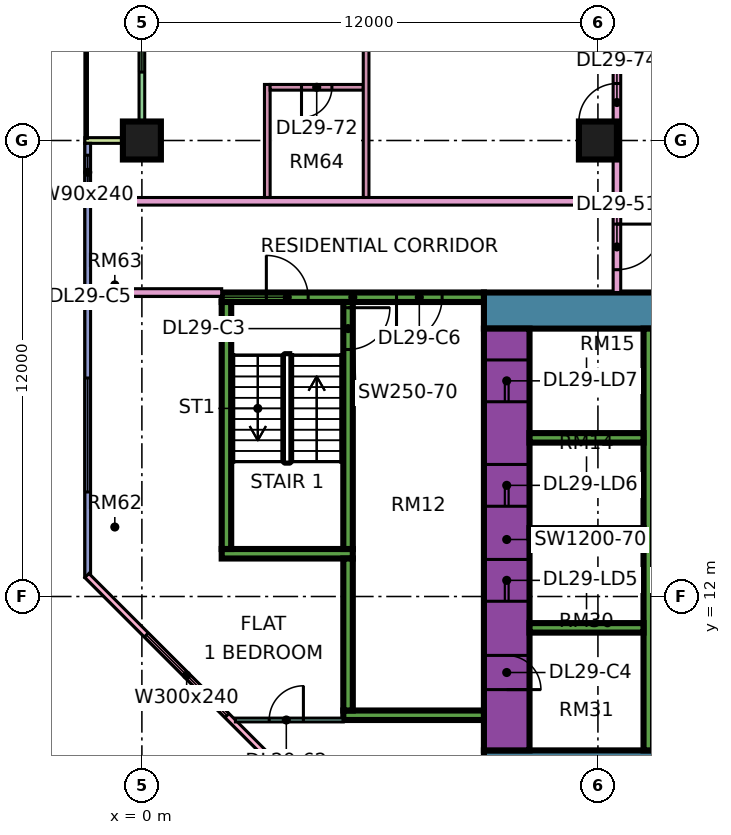
"""IFC4 building model, lengths in metres.
Left out: names, types, materials, properties, quantities, classifications, styles, units other than length and angle.
Written with IfcOpenShell. Run it as: python <this file> out.ifc"""

import sys

from ifc_helpers import new_model, si_unit, direction, frame, frame_2d, origin, origin_2d, place, context, subcontext, project, spatial, rectangle, extrude, element, fill, save


model = new_model("IFC4")
c1 = context("Model", 3, precision=1e-05, world=origin(), true_north=direction((0.0, 1.0)))
c2 = subcontext(c1, "Body", "Model", "MODEL_VIEW")
j1 = project(units=[si_unit("LENGTHUNIT", "METRE"), si_unit("PLANEANGLEUNIT", "RADIAN")], contexts=[c1])
p1 = place(None, origin())
s1 = spatial("IfcSite", under=j1, at=p1, CompositionType="ELEMENT")
p2 = place(p1, origin())
s2 = spatial("IfcBuilding", under=s1, at=p2, CompositionType="ELEMENT")
p3 = place(p2, frame((0.0, 0.0, 125.65)))
s3 = spatial("IfcBuildingStorey", under=s2, at=p3, CompositionType="ELEMENT", Elevation=125.65)
for number, where, z_axis, x_axis in (
    (1, (0.0, 24.0, 0.0), (0.0, 0.0, 1.0), (1.0, 0.0, 0.0)),
    (2, (12.0, 24.0, 0.0), (0.0, 0.0, 1.0), (1.0, 0.0, 0.0)),
):
    element("IfcColumn", number, at=place(p3, frame(where, z_axis=z_axis, x_axis=x_axis)), inside=s3, PredefinedType="COLUMN", context=c2, shape_type="SweptSolid", body=[
        extrude(rectangle(XDim=1.0, YDim=1.0, at=origin_2d()), origin(), (0.0, 0.0, 1.0), 3.75),
    ])
p4 = place(p3, frame((9.0, 7.475, 0.0), z_axis=(0.0, 0.0, 1.0), x_axis=(1.0, 0.0, 0.0)))
e3 = element("IfcWall", 3, at=p4, inside=s3, PredefinedType="SHEAR", context=c2, shape_type="SweptSolid", body=[
    extrude(rectangle(XDim=25.0, YDim=0.95, at=frame_2d((12.5, 0.0))), origin(), (0.0, 0.0, 1.0), 3.75),
])
p5 = place(p3, frame((9.0, 19.525, 0.0), z_axis=(0.0, 0.0, 1.0), x_axis=(1.0, 0.0, 0.0)))
e4 = element("IfcWall", 4, at=p5, inside=s3, PredefinedType="SHEAR", context=c2, shape_type="SweptSolid", body=[
    extrude(rectangle(XDim=25.0, YDim=0.95, at=frame_2d((12.5, 0.0))), origin(), (0.0, 0.0, 1.0), 3.75),
])
p6 = place(p5, frame((19.1, 0.0, 0.0)))
e5 = element("IfcOpeningElement", 5, at=p6, cuts=e4, PredefinedType="OPENING", context=c2, shape_type="SweptSolid", body=[
    extrude(rectangle(XDim=1.8, YDim=2.4, at=frame_2d((0.9, 1.2))), frame((0.0, 0.485, 0.0), z_axis=(0.0, -1.0, 0.0), x_axis=(1.0, 0.0, 0.0)), (0.0, 0.0, 1.0), 0.97),
])
p7 = place(p3, frame((9.6, 7.95, 0.0), z_axis=(0.0, 0.0, 1.0), x_axis=(0.0, 1.0, 0.0)))
e6 = element("IfcWall", 6, at=p7, inside=s3, PredefinedType="SHEAR", context=c2, shape_type="SweptSolid", body=[
    extrude(rectangle(XDim=11.1, YDim=1.2, at=frame_2d((5.55, 0.0))), origin(), (0.0, 0.0, 1.0), 3.75),
])
p8 = place(p7, frame((3.925, 0.0, 0.0)))
e7 = element("IfcOpeningElement", 7, at=p8, cuts=e6, PredefinedType="OPENING", context=c2, shape_type="SweptSolid", body=[
    extrude(rectangle(XDim=1.1, YDim=2.2, at=frame_2d((0.55, 1.1))), frame((0.0, 0.61, 0.0), z_axis=(0.0, -1.0, 0.0), x_axis=(1.0, 0.0, 0.0)), (0.0, 0.0, 1.0), 1.22),
])
p9 = place(p7, frame((6.425, 0.0, 0.0)))
e8 = element("IfcOpeningElement", 8, at=p9, cuts=e6, PredefinedType="OPENING", context=c2, shape_type="SweptSolid", body=[
    extrude(rectangle(XDim=1.1, YDim=2.2, at=frame_2d((0.55, 1.1))), frame((0.0, 0.61, 0.0), z_axis=(0.0, -1.0, 0.0), x_axis=(1.0, 0.0, 0.0)), (0.0, 0.0, 1.0), 1.22),
])
p10 = place(p7, frame((9.175, 0.0, 0.0)))
e9 = element("IfcOpeningElement", 9, at=p10, cuts=e6, PredefinedType="OPENING", context=c2, shape_type="SweptSolid", body=[
    extrude(rectangle(XDim=1.1, YDim=2.2, at=frame_2d((0.55, 1.1))), frame((0.0, 0.61, 0.0), z_axis=(0.0, -1.0, 0.0), x_axis=(1.0, 0.0, 0.0)), (0.0, 0.0, 1.0), 1.22),
])
p11 = place(p7, frame((1.6, 0.0, 0.0)))
e10 = element("IfcOpeningElement", 10, at=p11, cuts=e6, PredefinedType="OPENING", context=c2, shape_type="SweptSolid", body=[
    extrude(rectangle(XDim=0.9, YDim=2.1, at=frame_2d((0.45, 1.05))), frame((0.0, 0.61, 0.0), z_axis=(0.0, -1.0, 0.0), x_axis=(1.0, 0.0, 0.0)), (0.0, 0.0, 1.0), 1.22),
])
p12 = place(p3, frame((13.325, 7.95, 0.0), z_axis=(0.0, 0.0, 1.0), x_axis=(0.0, 1.0, 0.0)))
e11 = element("IfcWall", 11, at=p12, inside=s3, PredefinedType="SHEAR", context=c2, shape_type="SweptSolid", body=[
    extrude(rectangle(XDim=11.1, YDim=0.25, at=frame_2d((5.55, 0.0))), origin(), (0.0, 0.0, 1.0), 3.75),
])
for number, where, z_axis, x_axis in (
    (12, (10.2, 11.175, 0.0), (0.0, 0.0, 1.0), (1.0, 0.0, 0.0)),
    (13, (10.2, 13.675, 0.0), (0.0, 0.0, 1.0), (1.0, 0.0, 0.0)),
    (14, (10.2, 16.175, 0.0), (0.0, 0.0, 1.0), (1.0, 0.0, 0.0)),
):
    element("IfcWall", number, at=place(p3, frame(where, z_axis=z_axis, x_axis=x_axis)), inside=s3, PredefinedType="SHEAR", context=c2, shape_type="SweptSolid", body=[
        extrude(rectangle(XDim=3.0, YDim=0.25, at=frame_2d((1.5, 0.0))), origin(), (0.0, 0.0, 1.0), 3.75),
    ])
p13 = place(p3, frame((2.1, 19.875, 0.0), z_axis=(0.0, 0.0, 1.0), x_axis=(1.0, 0.0, 0.0)))
e15 = element("IfcWall", 15, at=p13, inside=s3, PredefinedType="SHEAR", context=c2, shape_type="SweptSolid", body=[
    extrude(rectangle(XDim=6.9, YDim=0.25, at=frame_2d((3.45, 0.0))), origin(), (0.0, 0.0, 1.0), 3.75),
])
p14 = place(p13, frame((1.175, 0.0, 0.0)))
e16 = element("IfcOpeningElement", 16, at=p14, cuts=e15, PredefinedType="OPENING", context=c2, shape_type="SweptSolid", body=[
    extrude(rectangle(XDim=1.1, YDim=2.2, at=frame_2d((0.55, 1.1))), frame((0.0, 0.135, 0.0), z_axis=(0.0, -1.0, 0.0), x_axis=(1.0, 0.0, 0.0)), (0.0, 0.0, 1.0), 0.27),
])
p15 = place(p13, frame((4.6, 0.0, 0.0)))
e17 = element("IfcOpeningElement", 17, at=p15, cuts=e15, PredefinedType="OPENING", context=c2, shape_type="SweptSolid", body=[
    extrude(rectangle(XDim=1.2, YDim=2.2, at=frame_2d((0.6, 1.1))), frame((0.0, 0.135, 0.0), z_axis=(0.0, -1.0, 0.0), x_axis=(1.0, 0.0, 0.0)), (0.0, 0.0, 1.0), 0.27),
])
p16 = place(p3, frame((2.1, 13.125, 0.0), z_axis=(0.0, 0.0, 1.0), x_axis=(1.0, 0.0, 0.0)))
e18 = element("IfcWall", 18, at=p16, inside=s3, PredefinedType="SHEAR", context=c2, shape_type="SweptSolid", body=[
    extrude(rectangle(XDim=3.45, YDim=0.25, at=frame_2d((1.725, 0.0))), origin(), (0.0, 0.0, 1.0), 3.75),
])
p17 = place(p3, frame((2.225, 13.25, 0.0), z_axis=(0.0, 0.0, 1.0), x_axis=(0.0, 1.0, 0.0)))
e19 = element("IfcWall", 19, at=p17, inside=s3, PredefinedType="SHEAR", context=c2, shape_type="SweptSolid", body=[
    extrude(rectangle(XDim=6.5, YDim=0.25, at=frame_2d((3.25, 0.0))), origin(), (0.0, 0.0, 1.0), 3.75),
])
p18 = place(p3, frame((5.425, 13.25, 0.0), z_axis=(0.0, 0.0, 1.0), x_axis=(0.0, 1.0, 0.0)))
e20 = element("IfcWall", 20, at=p18, inside=s3, PredefinedType="SHEAR", context=c2, shape_type="SweptSolid", body=[
    extrude(rectangle(XDim=6.5, YDim=0.25, at=frame_2d((3.25, 0.0))), origin(), (0.0, 0.0, 1.0), 3.75),
])
p19 = place(p18, frame((5.25, 0.0, 0.0)))
e21 = element("IfcOpeningElement", 21, at=p19, cuts=e20, PredefinedType="OPENING", context=c2, shape_type="SweptSolid", body=[
    extrude(rectangle(XDim=1.1, YDim=2.2, at=frame_2d((0.55, 1.1))), frame((0.0, 0.135, 0.0), z_axis=(0.0, -1.0, 0.0), x_axis=(1.0, 0.0, 0.0)), (0.0, 0.0, 1.0), 0.27),
])
p20 = place(p3, frame((5.3, 8.875, 0.0), z_axis=(0.0, 0.0, 1.0), x_axis=(1.0, 0.0, 0.0)))
e22 = element("IfcWall", 22, at=p20, inside=s3, PredefinedType="SHEAR", context=c2, shape_type="SweptSolid", body=[
    extrude(rectangle(XDim=3.7, YDim=0.25, at=frame_2d((1.85, 0.0))), origin(), (0.0, 0.0, 1.0), 3.75),
])
p21 = place(p3, frame((5.425, 9.0, 0.0), z_axis=(0.0, 0.0, 1.0), x_axis=(0.0, 1.0, 0.0)))
e23 = element("IfcWall", 23, at=p21, inside=s3, PredefinedType="SHEAR", context=c2, shape_type="SweptSolid", body=[
    extrude(rectangle(XDim=4.0, YDim=0.25, at=frame_2d((2.0, 0.0))), origin(), (0.0, 0.0, 1.0), 3.75),
])
p22 = place(p3, frame((0.0, 35.925, 0.0), z_axis=(0.0, 0.0, 1.0), x_axis=(0.0, -1.0, 0.0)))
e24 = element("IfcWall", 24, at=p22, inside=s3, PredefinedType="SOLIDWALL", context=c2, shape_type="SweptSolid", body=[
    extrude(rectangle(XDim=11.85, YDim=0.15, at=frame_2d((5.925, 0.0))), origin(), (0.0, 0.0, 1.0), 3.35),
])
p23 = place(p22, frame((2.325, 0.0, 0.0)))
e25 = element("IfcOpeningElement", 25, at=p23, cuts=e24, PredefinedType="OPENING", context=c2, shape_type="SweptSolid", body=[
    extrude(rectangle(XDim=1.8, YDim=2.4, at=frame_2d((0.9, 1.2))), frame((0.0, 0.085, 0.0), z_axis=(0.0, -1.0, 0.0), x_axis=(1.0, 0.0, 0.0)), (0.0, 0.0, 1.0), 0.17),
])
p24 = place(p22, frame((7.125, 0.0, 0.45)))
e26 = element("IfcOpeningElement", 26, at=p24, cuts=e24, PredefinedType="OPENING", context=c2, shape_type="SweptSolid", body=[
    extrude(rectangle(XDim=3.0, YDim=2.4, at=frame_2d((1.5, 1.2))), frame((0.0, 0.085, 0.0), z_axis=(0.0, -1.0, 0.0), x_axis=(1.0, 0.0, 0.0)), (0.0, 0.0, 1.0), 0.17),
])
p25 = place(p3, frame((-1.5, 24.0, 0.0), z_axis=(0.0, 0.0, 1.0), x_axis=(1.0, 0.0, 0.0)))
e27 = element("IfcWall", 27, at=p25, inside=s3, PredefinedType="SOLIDWALL", context=c2, shape_type="SweptSolid", body=[
    extrude(rectangle(XDim=1.5, YDim=0.15, at=frame_2d((0.75, 0.0))), origin(), (0.0, 0.0, 1.0), 3.35),
])
p26 = place(p3, frame((-1.425, 23.925, 0.0), z_axis=(0.0, 0.0, 1.0), x_axis=(0.0, -1.0, 0.0)))
e28 = element("IfcWall", 28, at=p26, inside=s3, PredefinedType="SOLIDWALL", context=c2, shape_type="SweptSolid", body=[
    extrude(rectangle(XDim=11.425, YDim=0.15, at=frame_2d((5.712, 0.0))), origin(), (0.0, 0.0, 1.0), 3.35),
])
p27 = place(p26, frame((0.312, 0.0, 0.45)))
e29 = element("IfcOpeningElement", 29, at=p27, cuts=e28, PredefinedType="OPENING", context=c2, shape_type="SweptSolid", body=[
    extrude(rectangle(XDim=0.9, YDim=2.4, at=frame_2d((0.45, 1.2))), frame((0.0, 0.085, 0.0), z_axis=(0.0, -1.0, 0.0), x_axis=(1.0, 0.0, 0.0)), (0.0, 0.0, 1.0), 0.17),
])
p28 = place(p26, frame((6.175, 0.0, 0.45)))
e30 = element("IfcOpeningElement", 30, at=p28, cuts=e28, PredefinedType="OPENING", context=c2, shape_type="SweptSolid", body=[
    extrude(rectangle(XDim=3.0, YDim=2.4, at=frame_2d((1.5, 1.2))), frame((0.0, 0.085, 0.0), z_axis=(0.0, -1.0, 0.0), x_axis=(1.0, 0.0, 0.0)), (0.0, 0.0, 1.0), 0.17),
])
p29 = place(p3, frame((-1.447, 12.553, 0.0), z_axis=(0.0, 0.0, 1.0), x_axis=(0.707106781187, -0.707106781187, 0.0)))
e31 = element("IfcWall", 31, at=p29, inside=s3, PredefinedType="SOLIDWALL", context=c2, shape_type="SweptSolid", body=[
    extrude(rectangle(XDim=19.799, YDim=0.15, at=frame_2d((9.899, 0.0))), origin(), (0.0, 0.0, 1.0), 3.35),
])
p30 = place(p29, frame((2.212, 0.0, 0.45)))
e32 = element("IfcOpeningElement", 32, at=p30, cuts=e31, PredefinedType="OPENING", context=c2, shape_type="SweptSolid", body=[
    extrude(rectangle(XDim=3.0, YDim=2.4, at=frame_2d((1.5, 1.2))), frame((0.0, 0.085, 0.0), z_axis=(0.0, -1.0, 0.0), x_axis=(1.0, 0.0, 0.0)), (0.0, 0.0, 1.0), 0.17),
])
p31 = place(p29, frame((10.216, 0.0, 0.45)))
e33 = element("IfcOpeningElement", 33, at=p31, cuts=e31, PredefinedType="OPENING", context=c2, shape_type="SweptSolid", body=[
    extrude(rectangle(XDim=3.0, YDim=2.4, at=frame_2d((1.5, 1.2))), frame((0.0, 0.085, 0.0), z_axis=(0.0, -1.0, 0.0), x_axis=(1.0, 0.0, 0.0)), (0.0, 0.0, 1.0), 0.17),
])
p32 = place(p3, frame((-1.35, 20.0, 0.0), z_axis=(0.0, 0.0, 1.0), x_axis=(1.0, 0.0, 0.0)))
e34 = element("IfcWall", 34, at=p32, inside=s3, PredefinedType="PARTITIONING", context=c2, shape_type="SweptSolid", body=[
    extrude(rectangle(XDim=3.45, YDim=0.2, at=frame_2d((1.725, 0.0))), origin(), (0.0, 0.0, 1.0), 3.35),
])
p33 = place(p3, frame((-1.35, 22.4, 0.0), z_axis=(0.0, 0.0, 1.0), x_axis=(1.0, 0.0, 0.0)))
e35 = element("IfcWall", 35, at=p33, inside=s3, PredefinedType="PARTITIONING", context=c2, shape_type="SweptSolid", body=[
    extrude(rectangle(XDim=13.75, YDim=0.2, at=frame_2d((6.875, 0.0))), origin(), (0.0, 0.0, 1.0), 3.35),
])
p34 = place(p3, frame((2.461, 8.75, 0.0), z_axis=(0.0, 0.0, 1.0), x_axis=(1.0, 0.0, 0.0)))
e36 = element("IfcWall", 36, at=p34, inside=s3, PredefinedType="PARTITIONING", context=c2, shape_type="SweptSolid", body=[
    extrude(rectangle(XDim=2.839, YDim=0.1, at=frame_2d((1.419, 0.0))), origin(), (0.0, 0.0, 1.0), 3.35),
])
p35 = place(p34, frame((0.889, 0.0, 0.0)))
e37 = element("IfcOpeningElement", 37, at=p35, cuts=e36, PredefinedType="OPENING", context=c2, shape_type="SweptSolid", body=[
    extrude(rectangle(XDim=0.9, YDim=2.1, at=frame_2d((0.45, 1.05))), frame((0.0, 0.06, 0.0), z_axis=(0.0, -1.0, 0.0), x_axis=(1.0, 0.0, 0.0)), (0.0, 0.0, 1.0), 0.12),
])
p36 = place(p3, frame((3.3, 22.5, 0.0), z_axis=(0.0, 0.0, 1.0), x_axis=(0.0, 1.0, 0.0)))
e38 = element("IfcWall", 38, at=p36, inside=s3, PredefinedType="PARTITIONING", context=c2, shape_type="SweptSolid", body=[
    extrude(rectangle(XDim=2.975, YDim=0.15, at=frame_2d((1.488, 0.0))), origin(), (0.0, 0.0, 1.0), 3.35),
])
p37 = place(p3, frame((3.375, 25.4, 0.0), z_axis=(0.0, 0.0, 1.0), x_axis=(1.0, 0.0, 0.0)))
e39 = element("IfcWall", 39, at=p37, inside=s3, PredefinedType="PARTITIONING", context=c2, shape_type="SweptSolid", body=[
    extrude(rectangle(XDim=2.45, YDim=0.15, at=frame_2d((1.225, 0.0))), origin(), (0.0, 0.0, 1.0), 3.35),
])
p38 = place(p37, frame((0.825, 0.0, 0.0)))
e40 = element("IfcOpeningElement", 40, at=p38, cuts=e39, PredefinedType="OPENING", context=c2, shape_type="SweptSolid", body=[
    extrude(rectangle(XDim=0.8, YDim=2.1, at=frame_2d((0.4, 1.05))), frame((0.0, 0.085, 0.0), z_axis=(0.0, -1.0, 0.0), x_axis=(1.0, 0.0, 0.0)), (0.0, 0.0, 1.0), 0.17),
])
p39 = place(p3, frame((5.9, 22.5, 0.0), z_axis=(0.0, 0.0, 1.0), x_axis=(0.0, 1.0, 0.0)))
e41 = element("IfcWall", 41, at=p39, inside=s3, PredefinedType="PARTITIONING", context=c2, shape_type="SweptSolid", body=[
    extrude(rectangle(XDim=7.55, YDim=0.15, at=frame_2d((3.775, 0.0))), origin(), (0.0, 0.0, 1.0), 3.35),
])
p40 = place(p3, frame((12.5, 20.0, 0.0), z_axis=(0.0, 0.0, 1.0), x_axis=(0.0, 1.0, 0.0)))
e42 = element("IfcWall", 42, at=p40, inside=s3, PredefinedType="PARTITIONING", context=c2, shape_type="SweptSolid", body=[
    extrude(rectangle(XDim=43.0, YDim=0.2, at=frame_2d((21.5, 0.0))), origin(), (0.0, 0.0, 1.0), 3.35),
])
p41 = place(p40, frame((19.65, 0.0, 0.0)))
e43 = element("IfcOpeningElement", 43, at=p41, cuts=e42, PredefinedType="OPENING", context=c2, shape_type="SweptSolid", body=[
    extrude(rectangle(XDim=1.0, YDim=2.1, at=frame_2d((0.5, 1.05))), frame((0.0, 0.11, 0.0), z_axis=(0.0, -1.0, 0.0), x_axis=(1.0, 0.0, 0.0)), (0.0, 0.0, 1.0), 0.22),
])
p42 = place(p40, frame((0.6, 0.0, 0.0)))
e44 = element("IfcOpeningElement", 44, at=p42, cuts=e42, PredefinedType="OPENING", context=c2, shape_type="SweptSolid", body=[
    extrude(rectangle(XDim=1.2, YDim=2.1, at=frame_2d((0.6, 1.05))), frame((0.0, 0.11, 0.0), z_axis=(0.0, -1.0, 0.0), x_axis=(1.0, 0.0, 0.0)), (0.0, 0.0, 1.0), 0.22),
])
p43 = place(p40, frame((4.5, 0.0, 0.0)))
e45 = element("IfcOpeningElement", 45, at=p43, cuts=e42, PredefinedType="OPENING", context=c2, shape_type="SweptSolid", body=[
    extrude(rectangle(XDim=1.0, YDim=2.1, at=frame_2d((0.5, 1.05))), frame((0.0, 0.11, 0.0), z_axis=(0.0, -1.0, 0.0), x_axis=(1.0, 0.0, 0.0)), (0.0, 0.0, 1.0), 0.22),
])
p44 = place(p24, origin())
e46 = element("IfcWindow", 46, at=p44, inside=s3, PartitioningType="SINGLE_PANEL", PredefinedType="WINDOW", context=c2, shape_type="SweptSolid", body=[
    extrude(rectangle(XDim=3.0, YDim=2.4, at=frame_2d((1.5, 1.2))), frame((0.0, 0.03, 0.0), z_axis=(0.0, -1.0, 0.0), x_axis=(1.0, 0.0, 0.0)), (0.0, 0.0, 1.0), 0.06),
])
fill(e26, e46)
p45 = place(p27, origin())
e47 = element("IfcWindow", 47, at=p45, inside=s3, PartitioningType="SINGLE_PANEL", PredefinedType="WINDOW", context=c2, shape_type="SweptSolid", body=[
    extrude(rectangle(XDim=0.9, YDim=2.4, at=frame_2d((0.45, 1.2))), frame((0.0, 0.03, 0.0), z_axis=(0.0, -1.0, 0.0), x_axis=(1.0, 0.0, 0.0)), (0.0, 0.0, 1.0), 0.06),
])
fill(e29, e47)
p46 = place(p28, origin())
e48 = element("IfcWindow", 48, at=p46, inside=s3, PartitioningType="SINGLE_PANEL", PredefinedType="WINDOW", context=c2, shape_type="SweptSolid", body=[
    extrude(rectangle(XDim=3.0, YDim=2.4, at=frame_2d((1.5, 1.2))), frame((0.0, 0.03, 0.0), z_axis=(0.0, -1.0, 0.0), x_axis=(1.0, 0.0, 0.0)), (0.0, 0.0, 1.0), 0.06),
])
fill(e30, e48)
p47 = place(p30, origin())
e49 = element("IfcWindow", 49, at=p47, inside=s3, PartitioningType="SINGLE_PANEL", PredefinedType="WINDOW", context=c2, shape_type="SweptSolid", body=[
    extrude(rectangle(XDim=3.0, YDim=2.4, at=frame_2d((1.5, 1.2))), frame((0.0, 0.03, 0.0), z_axis=(0.0, -1.0, 0.0), x_axis=(1.0, 0.0, 0.0)), (0.0, 0.0, 1.0), 0.06),
])
fill(e32, e49)
p48 = place(p8, origin())
e50 = element("IfcDoor", 50, at=p48, inside=s3, OperationType="DOUBLE_DOOR_SLIDING", PredefinedType="DOOR", context=c2, shape_type="SweptSolid", body=[
    extrude(rectangle(XDim=1.1, YDim=2.2, at=frame_2d((0.55, 1.1))), frame((0.0, 0.025, 0.0), z_axis=(0.0, -1.0, 0.0), x_axis=(1.0, 0.0, 0.0)), (0.0, 0.0, 1.0), 0.05),
])
fill(e7, e50)
p49 = place(p9, origin())
e51 = element("IfcDoor", 51, at=p49, inside=s3, OperationType="DOUBLE_DOOR_SLIDING", PredefinedType="DOOR", context=c2, shape_type="SweptSolid", body=[
    extrude(rectangle(XDim=1.1, YDim=2.2, at=frame_2d((0.55, 1.1))), frame((0.0, 0.025, 0.0), z_axis=(0.0, -1.0, 0.0), x_axis=(1.0, 0.0, 0.0)), (0.0, 0.0, 1.0), 0.05),
])
fill(e8, e51)
p50 = place(p10, origin())
e52 = element("IfcDoor", 52, at=p50, inside=s3, OperationType="DOUBLE_DOOR_SLIDING", PredefinedType="DOOR", context=c2, shape_type="SweptSolid", body=[
    extrude(rectangle(XDim=1.1, YDim=2.2, at=frame_2d((0.55, 1.1))), frame((0.0, 0.025, 0.0), z_axis=(0.0, -1.0, 0.0), x_axis=(1.0, 0.0, 0.0)), (0.0, 0.0, 1.0), 0.05),
])
fill(e9, e52)
p51 = place(p19, origin())
e53 = element("IfcDoor", 53, at=p51, inside=s3, OperationType="SINGLE_SWING_RIGHT", PredefinedType="DOOR", context=c2, shape_type="SweptSolid", body=[
    extrude(rectangle(XDim=1.1, YDim=2.2, at=frame_2d((0.55, 1.1))), frame((0.0, 0.025, 0.0), z_axis=(0.0, -1.0, 0.0), x_axis=(1.0, 0.0, 0.0)), (0.0, 0.0, 1.0), 0.05),
])
fill(e21, e53)
p52 = place(p11, frame((0.9, 0.0, 0.0), z_axis=(0.0, 0.0, 1.0), x_axis=(-1.0, 0.0, 0.0)))
e54 = element("IfcDoor", 54, at=p52, inside=s3, OperationType="SINGLE_SWING_LEFT", PredefinedType="DOOR", context=c2, shape_type="SweptSolid", body=[
    extrude(rectangle(XDim=0.9, YDim=2.1, at=frame_2d((0.45, 1.05))), frame((0.0, 0.025, 0.0), z_axis=(0.0, -1.0, 0.0), x_axis=(1.0, 0.0, 0.0)), (0.0, 0.0, 1.0), 0.05),
])
fill(e10, e54)
p53 = place(p14, origin())
e55 = element("IfcDoor", 55, at=p53, inside=s3, OperationType="SINGLE_SWING_LEFT", PredefinedType="DOOR", context=c2, shape_type="SweptSolid", body=[
    extrude(rectangle(XDim=1.1, YDim=2.2, at=frame_2d((0.55, 1.1))), frame((0.0, 0.025, 0.0), z_axis=(0.0, -1.0, 0.0), x_axis=(1.0, 0.0, 0.0)), (0.0, 0.0, 1.0), 0.05),
])
fill(e16, e55)
p54 = place(p15, frame((1.2, 0.0, 0.0), z_axis=(0.0, 0.0, 1.0), x_axis=(-1.0, 0.0, 0.0)))
e56 = element("IfcDoor", 56, at=p54, inside=s3, OperationType="SINGLE_SWING_LEFT", PredefinedType="DOOR", context=c2, shape_type="SweptSolid", body=[
    extrude(rectangle(XDim=1.2, YDim=2.2, at=frame_2d((0.6, 1.1))), frame((0.0, 0.025, 0.0), z_axis=(0.0, -1.0, 0.0), x_axis=(1.0, 0.0, 0.0)), (0.0, 0.0, 1.0), 0.05),
])
fill(e17, e56)
p55 = place(p42, origin())
e57 = element("IfcDoor", 57, at=p55, inside=s3, OperationType="SINGLE_SWING_RIGHT", PredefinedType="DOOR", context=c2, shape_type="SweptSolid", body=[
    extrude(rectangle(XDim=1.2, YDim=2.1, at=frame_2d((0.6, 1.05))), frame((0.0, 0.025, 0.0), z_axis=(0.0, -1.0, 0.0), x_axis=(1.0, 0.0, 0.0)), (0.0, 0.0, 1.0), 0.05),
])
fill(e44, e57)
p56 = place(p35, frame((0.9, 0.0, 0.0), z_axis=(0.0, 0.0, 1.0), x_axis=(-1.0, 0.0, 0.0)))
e58 = element("IfcDoor", 58, at=p56, inside=s3, OperationType="SINGLE_SWING_RIGHT", PredefinedType="DOOR", context=c2, shape_type="SweptSolid", body=[
    extrude(rectangle(XDim=0.9, YDim=2.1, at=frame_2d((0.45, 1.05))), frame((0.0, 0.025, 0.0), z_axis=(0.0, -1.0, 0.0), x_axis=(1.0, 0.0, 0.0)), (0.0, 0.0, 1.0), 0.05),
])
fill(e37, e58)
p57 = place(p38, frame((0.8, 0.0, 0.0), z_axis=(0.0, 0.0, 1.0), x_axis=(-1.0, 0.0, 0.0)))
e59 = element("IfcDoor", 59, at=p57, inside=s3, OperationType="SINGLE_SWING_LEFT", PredefinedType="DOOR", context=c2, shape_type="SweptSolid", body=[
    extrude(rectangle(XDim=0.8, YDim=2.1, at=frame_2d((0.4, 1.05))), frame((0.0, 0.025, 0.0), z_axis=(0.0, -1.0, 0.0), x_axis=(1.0, 0.0, 0.0)), (0.0, 0.0, 1.0), 0.05),
])
fill(e40, e59)
p58 = place(p43, origin())
e60 = element("IfcDoor", 60, at=p58, inside=s3, OperationType="SINGLE_SWING_LEFT", PredefinedType="DOOR", context=c2, shape_type="SweptSolid", body=[
    extrude(rectangle(XDim=1.0, YDim=2.1, at=frame_2d((0.5, 1.05))), frame((0.0, 0.025, 0.0), z_axis=(0.0, -1.0, 0.0), x_axis=(1.0, 0.0, 0.0)), (0.0, 0.0, 1.0), 0.05),
])
fill(e45, e60)
save(model, sys.argv[1])
